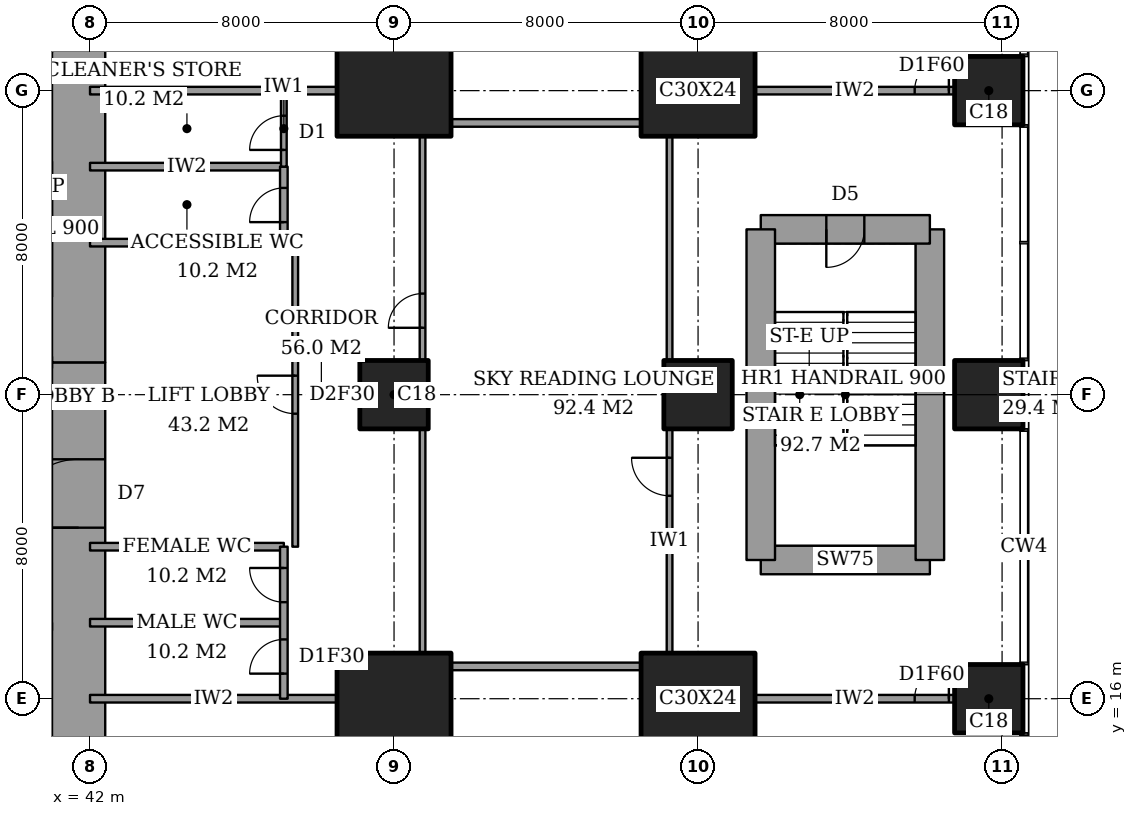
"""IFC4 building model, lengths in metres.
Left out: names, types, materials, properties, quantities, classifications, styles, units other than length and angle.
Written with IfcOpenShell. Run it as: python <this file> out.ifc"""

import sys

from ifc_helpers import new_model, si_unit, direction, frame, frame_2d, origin, origin_2d, place, context, subcontext, project, spatial, rectangle, extrude, element, fill, save


model = new_model("IFC4")
c1 = context("Model", 3, precision=1e-05, world=origin(), true_north=direction((0.0, 1.0)))
c2 = subcontext(c1, "Body", "Model", "MODEL_VIEW")
j1 = project(units=[si_unit("LENGTHUNIT", "METRE"), si_unit("PLANEANGLEUNIT", "RADIAN")], contexts=[c1])
p1 = place(None, origin())
s1 = spatial("IfcSite", under=j1, at=p1, CompositionType="ELEMENT")
p2 = place(p1, origin())
s2 = spatial("IfcBuilding", under=s1, at=p2, CompositionType="ELEMENT")
p3 = place(p2, frame((0.0, 0.0, 177.2)))
s3 = spatial("IfcBuildingStorey", under=s2, at=p3, CompositionType="ELEMENT", Elevation=177.2)
p4 = place(p3, frame((50.0, 16.0, 0.0), z_axis=(0.0, 0.0, 1.0), x_axis=(1.0, 0.0, 0.0)))
e1 = element("IfcColumn", 1, at=p4, inside=s3, PredefinedType="COLUMN", context=c2, shape_type="SweptSolid", body=[
    extrude(rectangle(XDim=3.0, YDim=2.4, at=origin_2d()), origin(), (0.0, 0.0, 1.0), 5.0),
])
p5 = place(p3, frame((50.0, 24.0, 0.0), z_axis=(0.0, 0.0, 1.0), x_axis=(1.0, 0.0, 0.0)))
e2 = element("IfcColumn", 2, at=p5, inside=s3, PredefinedType="COLUMN", context=c2, shape_type="SweptSolid", body=[
    extrude(rectangle(XDim=1.8, YDim=1.8, at=origin_2d()), origin(), (0.0, 0.0, 1.0), 5.0),
])
for number, where, z_axis, x_axis in (
    (3, (50.0, 32.0, 0.0), (0.0, 0.0, 1.0), (1.0, 0.0, 0.0)),
    (4, (58.0, 16.0, 0.0), (0.0, 0.0, 1.0), (1.0, 0.0, 0.0)),
):
    element("IfcColumn", number, at=place(p3, frame(where, z_axis=z_axis, x_axis=x_axis)), inside=s3, PredefinedType="COLUMN", context=c2, shape_type="SweptSolid", body=[
        extrude(rectangle(XDim=3.0, YDim=2.4, at=origin_2d()), origin(), (0.0, 0.0, 1.0), 5.0),
    ])
p6 = place(p3, frame((58.0, 24.0, 0.0), z_axis=(0.0, 0.0, 1.0), x_axis=(1.0, 0.0, 0.0)))
e5 = element("IfcColumn", 5, at=p6, inside=s3, PredefinedType="COLUMN", context=c2, shape_type="SweptSolid", body=[
    extrude(rectangle(XDim=1.8, YDim=1.8, at=origin_2d()), origin(), (0.0, 0.0, 1.0), 5.0),
])
p7 = place(p3, frame((58.0, 32.0, 0.0), z_axis=(0.0, 0.0, 1.0), x_axis=(1.0, 0.0, 0.0)))
e6 = element("IfcColumn", 6, at=p7, inside=s3, PredefinedType="COLUMN", context=c2, shape_type="SweptSolid", body=[
    extrude(rectangle(XDim=3.0, YDim=2.4, at=origin_2d()), origin(), (0.0, 0.0, 1.0), 5.0),
])
for number, where, z_axis, x_axis in (
    (7, (65.65, 16.0, 0.0), (0.0, 0.0, 1.0), (1.0, 0.0, 0.0)),
    (8, (65.65, 24.0, 0.0), (0.0, 0.0, 1.0), (1.0, 0.0, 0.0)),
    (9, (65.65, 32.0, 0.0), (0.0, 0.0, 1.0), (1.0, 0.0, 0.0)),
):
    element("IfcColumn", number, at=place(p3, frame(where, z_axis=z_axis, x_axis=x_axis)), inside=s3, PredefinedType="COLUMN", context=c2, shape_type="SweptSolid", body=[
        extrude(rectangle(XDim=1.8, YDim=1.8, at=origin_2d()), origin(), (0.0, 0.0, 1.0), 5.0),
    ])
p8 = place(p3, frame((41.7, 13.0, 0.0), z_axis=(0.0, 0.0, 1.0), x_axis=(0.0, 1.0, 0.0)))
e10 = element("IfcWall", 10, at=p8, inside=s3, PredefinedType="SHEAR", context=c2, shape_type="SweptSolid", body=[
    extrude(rectangle(XDim=11.85, YDim=1.4, at=frame_2d((5.925, 0.0))), origin(), (0.0, 0.0, 1.0), 5.0),
])
p9 = place(p8, frame((7.5, 0.0, 0.0)))
e11 = element("IfcOpeningElement", 11, at=p9, cuts=e10, PredefinedType="OPENING", context=c2, shape_type="SweptSolid", body=[
    extrude(rectangle(XDim=1.8, YDim=2.4, at=frame_2d((0.9, 1.2))), frame((0.0, 0.71, 0.0), z_axis=(0.0, -1.0, 0.0), x_axis=(1.0, 0.0, 0.0)), (0.0, 0.0, 1.0), 1.42),
])
p10 = place(p3, frame((41.7, 24.85, 0.0), z_axis=(0.0, 0.0, 1.0), x_axis=(0.0, 1.0, 0.0)))
e12 = element("IfcWall", 12, at=p10, inside=s3, PredefinedType="SHEAR", context=c2, shape_type="SweptSolid", body=[
    extrude(rectangle(XDim=10.15, YDim=1.4, at=frame_2d((5.075, 0.0))), origin(), (0.0, 0.0, 1.0), 5.0),
])
p11 = place(p3, frame((59.65, 19.65, 0.0), z_axis=(0.0, 0.0, 1.0), x_axis=(1.0, 0.0, 0.0)))
e13 = element("IfcWall", 13, at=p11, inside=s3, PredefinedType="SHEAR", context=c2, shape_type="SweptSolid", body=[
    extrude(rectangle(XDim=4.45, YDim=0.75, at=frame_2d((2.225, 0.0))), origin(), (0.0, 0.0, 1.0), 5.0),
])
p12 = place(p3, frame((64.1, 19.65, 0.0), z_axis=(0.0, 0.0, 1.0), x_axis=(0.0, 1.0, 0.0)))
e14 = element("IfcWall", 14, at=p12, inside=s3, PredefinedType="SHEAR", context=c2, shape_type="SweptSolid", body=[
    extrude(rectangle(XDim=8.7, YDim=0.75, at=frame_2d((4.35, 0.0))), origin(), (0.0, 0.0, 1.0), 5.0),
])
p13 = place(p3, frame((64.1, 28.35, 0.0), z_axis=(0.0, 0.0, 1.0), x_axis=(-1.0, 0.0, 0.0)))
e15 = element("IfcWall", 15, at=p13, inside=s3, PredefinedType="SHEAR", context=c2, shape_type="SweptSolid", body=[
    extrude(rectangle(XDim=4.45, YDim=0.75, at=frame_2d((2.225, 0.0))), origin(), (0.0, 0.0, 1.0), 5.0),
])
p14 = place(p13, frame((1.725, 0.0, 0.0)))
e16 = element("IfcOpeningElement", 16, at=p14, cuts=e15, PredefinedType="OPENING", context=c2, shape_type="SweptSolid", body=[
    extrude(rectangle(XDim=1.0, YDim=2.1, at=frame_2d((0.5, 1.05))), frame((0.0, 0.385, 0.0), z_axis=(0.0, -1.0, 0.0), x_axis=(1.0, 0.0, 0.0)), (0.0, 0.0, 1.0), 0.77),
])
p15 = place(p3, frame((59.65, 28.35, 0.0), z_axis=(0.0, 0.0, 1.0), x_axis=(0.0, -1.0, 0.0)))
e17 = element("IfcWall", 17, at=p15, inside=s3, PredefinedType="SHEAR", context=c2, shape_type="SweptSolid", body=[
    extrude(rectangle(XDim=8.7, YDim=0.75, at=frame_2d((4.35, 0.0))), origin(), (0.0, 0.0, 1.0), 5.0),
])
p16 = place(p3, frame((42.0, 16.0, 0.0), z_axis=(0.0, 0.0, 1.0), x_axis=(1.0, 0.0, 0.0)))
e18 = element("IfcWall", 18, at=p16, inside=s3, PredefinedType="PARTITIONING", context=c2, shape_type="SweptSolid", body=[
    extrude(rectangle(XDim=6.5, YDim=0.2, at=frame_2d((3.25, 0.0))), origin(), (0.0, 0.0, 1.0), 4.75),
])
p17 = place(p3, frame((59.5, 16.0, 0.0), z_axis=(0.0, 0.0, 1.0), x_axis=(1.0, 0.0, 0.0)))
e19 = element("IfcWall", 19, at=p17, inside=s3, PredefinedType="PARTITIONING", context=c2, shape_type="SweptSolid", body=[
    extrude(rectangle(XDim=5.25, YDim=0.2, at=frame_2d((2.625, 0.0))), origin(), (0.0, 0.0, 1.0), 4.75),
])
p18 = place(p17, frame((4.2, 0.0, 0.0)))
e20 = element("IfcOpeningElement", 20, at=p18, cuts=e19, PredefinedType="OPENING", context=c2, shape_type="SweptSolid", body=[
    extrude(rectangle(XDim=0.9, YDim=2.1, at=frame_2d((0.45, 1.05))), frame((0.0, 0.11, 0.0), z_axis=(0.0, -1.0, 0.0), x_axis=(1.0, 0.0, 0.0)), (0.0, 0.0, 1.0), 0.22),
])
p19 = place(p3, frame((51.5, 16.85, 0.0), z_axis=(0.0, 0.0, 1.0), x_axis=(1.0, 0.0, 0.0)))
e21 = element("IfcWall", 21, at=p19, inside=s3, PredefinedType="PARTITIONING", context=c2, shape_type="SweptSolid", body=[
    extrude(rectangle(XDim=5.0, YDim=0.2, at=frame_2d((2.5, 0.0))), origin(), (0.0, 0.0, 1.0), 4.75),
])
for number, where, z_axis, x_axis in (
    (22, (42.0, 18.0, 0.0), (0.0, 0.0, 1.0), (1.0, 0.0, 0.0)),
    (23, (42.0, 20.0, 0.0), (0.0, 0.0, 1.0), (1.0, 0.0, 0.0)),
    (24, (42.0, 28.0, 0.0), (0.0, 0.0, 1.0), (1.0, 0.0, 0.0)),
    (25, (42.0, 30.0, 0.0), (0.0, 0.0, 1.0), (1.0, 0.0, 0.0)),
):
    element("IfcWall", number, at=place(p3, frame(where, z_axis=z_axis, x_axis=x_axis)), inside=s3, PredefinedType="PARTITIONING", context=c2, shape_type="SweptSolid", body=[
        extrude(rectangle(XDim=5.1, YDim=0.2, at=frame_2d((2.55, 0.0))), origin(), (0.0, 0.0, 1.0), 4.75),
    ])
p20 = place(p3, frame((51.5, 31.15, 0.0), z_axis=(0.0, 0.0, 1.0), x_axis=(1.0, 0.0, 0.0)))
e26 = element("IfcWall", 26, at=p20, inside=s3, PredefinedType="PARTITIONING", context=c2, shape_type="SweptSolid", body=[
    extrude(rectangle(XDim=5.0, YDim=0.2, at=frame_2d((2.5, 0.0))), origin(), (0.0, 0.0, 1.0), 4.75),
])
p21 = place(p3, frame((42.0, 32.0, 0.0), z_axis=(0.0, 0.0, 1.0), x_axis=(1.0, 0.0, 0.0)))
e27 = element("IfcWall", 27, at=p21, inside=s3, PredefinedType="PARTITIONING", context=c2, shape_type="SweptSolid", body=[
    extrude(rectangle(XDim=6.5, YDim=0.2, at=frame_2d((3.25, 0.0))), origin(), (0.0, 0.0, 1.0), 4.75),
])
p22 = place(p3, frame((59.5, 32.0, 0.0), z_axis=(0.0, 0.0, 1.0), x_axis=(1.0, 0.0, 0.0)))
e28 = element("IfcWall", 28, at=p22, inside=s3, PredefinedType="PARTITIONING", context=c2, shape_type="SweptSolid", body=[
    extrude(rectangle(XDim=5.25, YDim=0.2, at=frame_2d((2.625, 0.0))), origin(), (0.0, 0.0, 1.0), 4.75),
])
p23 = place(p22, frame((4.2, 0.0, 0.0)))
e29 = element("IfcOpeningElement", 29, at=p23, cuts=e28, PredefinedType="OPENING", context=c2, shape_type="SweptSolid", body=[
    extrude(rectangle(XDim=0.9, YDim=2.1, at=frame_2d((0.45, 1.05))), frame((0.0, 0.11, 0.0), z_axis=(0.0, -1.0, 0.0), x_axis=(1.0, 0.0, 0.0)), (0.0, 0.0, 1.0), 0.22),
])
p24 = place(p3, frame((47.1, 16.0, 0.0), z_axis=(0.0, 0.0, 1.0), x_axis=(0.0, 1.0, 0.0)))
e30 = element("IfcWall", 30, at=p24, inside=s3, PredefinedType="PARTITIONING", context=c2, shape_type="SweptSolid", body=[
    extrude(rectangle(XDim=4.0, YDim=0.2, at=frame_2d((2.0, 0.0))), origin(), (0.0, 0.0, 1.0), 4.75),
])
p25 = place(p24, frame((0.66, 0.0, 0.0)))
e31 = element("IfcOpeningElement", 31, at=p25, cuts=e30, PredefinedType="OPENING", context=c2, shape_type="SweptSolid", body=[
    extrude(rectangle(XDim=0.9, YDim=2.1, at=frame_2d((0.45, 1.05))), frame((0.0, 0.11, 0.0), z_axis=(0.0, -1.0, 0.0), x_axis=(1.0, 0.0, 0.0)), (0.0, 0.0, 1.0), 0.22),
])
p26 = place(p24, frame((2.54, 0.0, 0.0)))
e32 = element("IfcOpeningElement", 32, at=p26, cuts=e30, PredefinedType="OPENING", context=c2, shape_type="SweptSolid", body=[
    extrude(rectangle(XDim=0.9, YDim=2.1, at=frame_2d((0.45, 1.05))), frame((0.0, 0.11, 0.0), z_axis=(0.0, -1.0, 0.0), x_axis=(1.0, 0.0, 0.0)), (0.0, 0.0, 1.0), 0.22),
])
p27 = place(p3, frame((47.1, 28.0, 0.0), z_axis=(0.0, 0.0, 1.0), x_axis=(0.0, 1.0, 0.0)))
e33 = element("IfcWall", 33, at=p27, inside=s3, PredefinedType="PARTITIONING", context=c2, shape_type="SweptSolid", body=[
    extrude(rectangle(XDim=2.0, YDim=0.2, at=frame_2d((1.0, 0.0))), origin(), (0.0, 0.0, 1.0), 4.75),
])
p28 = place(p27, frame((0.54, 0.0, 0.0)))
e34 = element("IfcOpeningElement", 34, at=p28, cuts=e33, PredefinedType="OPENING", context=c2, shape_type="SweptSolid", body=[
    extrude(rectangle(XDim=0.9, YDim=2.1, at=frame_2d((0.45, 1.05))), frame((0.0, 0.11, 0.0), z_axis=(0.0, -1.0, 0.0), x_axis=(1.0, 0.0, 0.0)), (0.0, 0.0, 1.0), 0.22),
])
p29 = place(p3, frame((47.1, 30.0, 0.0), z_axis=(0.0, 0.0, 1.0), x_axis=(0.0, 1.0, 0.0)))
e35 = element("IfcWall", 35, at=p29, inside=s3, PredefinedType="PARTITIONING", context=c2, shape_type="SweptSolid", body=[
    extrude(rectangle(XDim=2.0, YDim=0.15, at=frame_2d((1.0, 0.0))), origin(), (0.0, 0.0, 1.0), 4.75),
])
p30 = place(p29, frame((0.44, 0.0, 0.0)))
e36 = element("IfcOpeningElement", 36, at=p30, cuts=e35, PredefinedType="OPENING", context=c2, shape_type="SweptSolid", body=[
    extrude(rectangle(XDim=0.9, YDim=2.1, at=frame_2d((0.45, 1.05))), frame((0.0, 0.085, 0.0), z_axis=(0.0, -1.0, 0.0), x_axis=(1.0, 0.0, 0.0)), (0.0, 0.0, 1.0), 0.17),
])
p31 = place(p3, frame((47.4, 20.0, 0.0), z_axis=(0.0, 0.0, 1.0), x_axis=(0.0, 1.0, 0.0)))
e37 = element("IfcWall", 37, at=p31, inside=s3, PredefinedType="PARTITIONING", context=c2, shape_type="SweptSolid", body=[
    extrude(rectangle(XDim=8.0, YDim=0.15, at=frame_2d((4.0, 0.0))), origin(), (0.0, 0.0, 1.0), 4.75),
])
p32 = place(p31, frame((3.5, 0.0, 0.0)))
e38 = element("IfcOpeningElement", 38, at=p32, cuts=e37, PredefinedType="OPENING", context=c2, shape_type="SweptSolid", body=[
    extrude(rectangle(XDim=1.0, YDim=2.1, at=frame_2d((0.5, 1.05))), frame((0.0, 0.085, 0.0), z_axis=(0.0, -1.0, 0.0), x_axis=(1.0, 0.0, 0.0)), (0.0, 0.0, 1.0), 0.17),
])
p33 = place(p3, frame((50.75, 17.2, 0.0), z_axis=(0.0, 0.0, 1.0), x_axis=(0.0, 1.0, 0.0)))
e39 = element("IfcWall", 39, at=p33, inside=s3, PredefinedType="PARTITIONING", context=c2, shape_type="SweptSolid", body=[
    extrude(rectangle(XDim=5.9, YDim=0.15, at=frame_2d((2.95, 0.0))), origin(), (0.0, 0.0, 1.0), 4.75),
])
p34 = place(p3, frame((50.75, 24.9, 0.0), z_axis=(0.0, 0.0, 1.0), x_axis=(0.0, 1.0, 0.0)))
e40 = element("IfcWall", 40, at=p34, inside=s3, PredefinedType="PARTITIONING", context=c2, shape_type="SweptSolid", body=[
    extrude(rectangle(XDim=5.9, YDim=0.15, at=frame_2d((2.95, 0.0))), origin(), (0.0, 0.0, 1.0), 4.75),
])
p35 = place(p34, frame((0.86, 0.0, 0.0)))
e41 = element("IfcOpeningElement", 41, at=p35, cuts=e40, PredefinedType="OPENING", context=c2, shape_type="SweptSolid", body=[
    extrude(rectangle(XDim=0.9, YDim=2.1, at=frame_2d((0.45, 1.05))), frame((0.0, 0.085, 0.0), z_axis=(0.0, -1.0, 0.0), x_axis=(1.0, 0.0, 0.0)), (0.0, 0.0, 1.0), 0.17),
])
p36 = place(p3, frame((57.25, 17.2, 0.0), z_axis=(0.0, 0.0, 1.0), x_axis=(0.0, 1.0, 0.0)))
e42 = element("IfcWall", 42, at=p36, inside=s3, PredefinedType="PARTITIONING", context=c2, shape_type="SweptSolid", body=[
    extrude(rectangle(XDim=5.9, YDim=0.15, at=frame_2d((2.95, 0.0))), origin(), (0.0, 0.0, 1.0), 4.75),
])
p37 = place(p36, frame((4.14, 0.0, 0.0)))
e43 = element("IfcOpeningElement", 43, at=p37, cuts=e42, PredefinedType="OPENING", context=c2, shape_type="SweptSolid", body=[
    extrude(rectangle(XDim=1.0, YDim=2.1, at=frame_2d((0.5, 1.05))), frame((0.0, 0.085, 0.0), z_axis=(0.0, -1.0, 0.0), x_axis=(1.0, 0.0, 0.0)), (0.0, 0.0, 1.0), 0.17),
])
p38 = place(p3, frame((57.25, 24.9, 0.0), z_axis=(0.0, 0.0, 1.0), x_axis=(0.0, 1.0, 0.0)))
e44 = element("IfcWall", 44, at=p38, inside=s3, PredefinedType="PARTITIONING", context=c2, shape_type="SweptSolid", body=[
    extrude(rectangle(XDim=5.9, YDim=0.15, at=frame_2d((2.95, 0.0))), origin(), (0.0, 0.0, 1.0), 4.75),
])
p39 = place(p3, frame((28.3, 17.9, 0.0), z_axis=(0.0, 0.0, 1.0), x_axis=(1.0, 0.0, 0.0)))
e45 = element("IfcWall", 45, at=p39, inside=s3, PredefinedType="PARTITIONING", context=c2, shape_type="SweptSolid", body=[
    extrude(rectangle(XDim=12.7, YDim=0.2, at=frame_2d((6.35, 0.0))), origin(), (0.0, 0.0, 1.0), 5.0),
])
p40 = place(p39, frame((0.95, 0.0, 0.0)))
e46 = element("IfcOpeningElement", 46, at=p40, cuts=e45, PredefinedType="OPENING", context=c2, shape_type="SweptSolid", body=[
    extrude(rectangle(XDim=1.1, YDim=2.1, at=frame_2d((0.55, 1.05))), frame((0.0, 0.11, 0.0), z_axis=(0.0, -1.0, 0.0), x_axis=(1.0, 0.0, 0.0)), (0.0, 0.0, 1.0), 0.22),
])
p41 = place(p39, frame((4.15, 0.0, 0.0)))
e47 = element("IfcOpeningElement", 47, at=p41, cuts=e45, PredefinedType="OPENING", context=c2, shape_type="SweptSolid", body=[
    extrude(rectangle(XDim=1.1, YDim=2.1, at=frame_2d((0.55, 1.05))), frame((0.0, 0.11, 0.0), z_axis=(0.0, -1.0, 0.0), x_axis=(1.0, 0.0, 0.0)), (0.0, 0.0, 1.0), 0.22),
])
p42 = place(p39, frame((7.35, 0.0, 0.0)))
e48 = element("IfcOpeningElement", 48, at=p42, cuts=e45, PredefinedType="OPENING", context=c2, shape_type="SweptSolid", body=[
    extrude(rectangle(XDim=1.1, YDim=2.1, at=frame_2d((0.55, 1.05))), frame((0.0, 0.11, 0.0), z_axis=(0.0, -1.0, 0.0), x_axis=(1.0, 0.0, 0.0)), (0.0, 0.0, 1.0), 0.22),
])
p43 = place(p39, frame((10.6, 0.0, 0.0)))
e49 = element("IfcOpeningElement", 49, at=p43, cuts=e45, PredefinedType="OPENING", context=c2, shape_type="SweptSolid", body=[
    extrude(rectangle(XDim=1.2, YDim=2.1, at=frame_2d((0.6, 1.05))), frame((0.0, 0.11, 0.0), z_axis=(0.0, -1.0, 0.0), x_axis=(1.0, 0.0, 0.0)), (0.0, 0.0, 1.0), 0.22),
])
p44 = place(p37, origin())
e50 = element("IfcDoor", 50, at=p44, inside=s3, OperationType="SINGLE_SWING_LEFT", PredefinedType="DOOR", context=c2, shape_type="SweptSolid", body=[
    extrude(rectangle(XDim=1.0, YDim=2.1, at=frame_2d((0.5, 1.05))), frame((0.0, 0.025, 0.0), z_axis=(0.0, -1.0, 0.0), x_axis=(1.0, 0.0, 0.0)), (0.0, 0.0, 1.0), 0.05),
])
fill(e43, e50)
p45 = place(p35, origin())
e51 = element("IfcDoor", 51, at=p45, inside=s3, OperationType="SINGLE_SWING_RIGHT", PredefinedType="DOOR", context=c2, shape_type="SweptSolid", body=[
    extrude(rectangle(XDim=0.9, YDim=2.1, at=frame_2d((0.45, 1.05))), frame((0.0, 0.025, 0.0), z_axis=(0.0, -1.0, 0.0), x_axis=(1.0, 0.0, 0.0)), (0.0, 0.0, 1.0), 0.05),
])
fill(e41, e51)
p46 = place(p32, origin())
e52 = element("IfcDoor", 52, at=p46, inside=s3, OperationType="SINGLE_SWING_LEFT", PredefinedType="DOOR", context=c2, shape_type="SweptSolid", body=[
    extrude(rectangle(XDim=1.0, YDim=2.1, at=frame_2d((0.5, 1.05))), frame((0.0, 0.025, 0.0), z_axis=(0.0, -1.0, 0.0), x_axis=(1.0, 0.0, 0.0)), (0.0, 0.0, 1.0), 0.05),
])
fill(e38, e52)
p47 = place(p25, origin())
e53 = element("IfcDoor", 53, at=p47, inside=s3, OperationType="SINGLE_SWING_RIGHT", PredefinedType="DOOR", context=c2, shape_type="SweptSolid", body=[
    extrude(rectangle(XDim=0.9, YDim=2.1, at=frame_2d((0.45, 1.05))), frame((0.0, 0.025, 0.0), z_axis=(0.0, -1.0, 0.0), x_axis=(1.0, 0.0, 0.0)), (0.0, 0.0, 1.0), 0.05),
])
fill(e31, e53)
p48 = place(p26, origin())
e54 = element("IfcDoor", 54, at=p48, inside=s3, OperationType="SINGLE_SWING_LEFT", PredefinedType="DOOR", context=c2, shape_type="SweptSolid", body=[
    extrude(rectangle(XDim=0.9, YDim=2.1, at=frame_2d((0.45, 1.05))), frame((0.0, 0.025, 0.0), z_axis=(0.0, -1.0, 0.0), x_axis=(1.0, 0.0, 0.0)), (0.0, 0.0, 1.0), 0.05),
])
fill(e32, e54)
p49 = place(p28, origin())
e55 = element("IfcDoor", 55, at=p49, inside=s3, OperationType="SINGLE_SWING_RIGHT", PredefinedType="DOOR", context=c2, shape_type="SweptSolid", body=[
    extrude(rectangle(XDim=0.9, YDim=2.1, at=frame_2d((0.45, 1.05))), frame((0.0, 0.025, 0.0), z_axis=(0.0, -1.0, 0.0), x_axis=(1.0, 0.0, 0.0)), (0.0, 0.0, 1.0), 0.05),
])
fill(e34, e55)
p50 = place(p30, origin())
e56 = element("IfcDoor", 56, at=p50, inside=s3, OperationType="SINGLE_SWING_RIGHT", PredefinedType="DOOR", context=c2, shape_type="SweptSolid", body=[
    extrude(rectangle(XDim=0.9, YDim=2.1, at=frame_2d((0.45, 1.05))), frame((0.0, 0.025, 0.0), z_axis=(0.0, -1.0, 0.0), x_axis=(1.0, 0.0, 0.0)), (0.0, 0.0, 1.0), 0.05),
])
fill(e36, e56)
p51 = place(p18, origin())
e57 = element("IfcDoor", 57, at=p51, inside=s3, OperationType="SINGLE_SWING_LEFT", PredefinedType="DOOR", context=c2, shape_type="SweptSolid", body=[
    extrude(rectangle(XDim=0.9, YDim=2.1, at=frame_2d((0.45, 1.05))), frame((0.0, 0.025, 0.0), z_axis=(0.0, -1.0, 0.0), x_axis=(1.0, 0.0, 0.0)), (0.0, 0.0, 1.0), 0.05),
])
fill(e20, e57)
p52 = place(p23, origin())
e58 = element("IfcDoor", 58, at=p52, inside=s3, OperationType="SINGLE_SWING_LEFT", PredefinedType="DOOR", context=c2, shape_type="SweptSolid", body=[
    extrude(rectangle(XDim=0.9, YDim=2.1, at=frame_2d((0.45, 1.05))), frame((0.0, 0.025, 0.0), z_axis=(0.0, -1.0, 0.0), x_axis=(1.0, 0.0, 0.0)), (0.0, 0.0, 1.0), 0.05),
])
fill(e29, e58)
p53 = place(p9, origin())
e59 = element("IfcDoor", 59, at=p53, inside=s3, OperationType="DOUBLE_DOOR_DOUBLE_SWING", PredefinedType="DOOR", context=c2, shape_type="SweptSolid", body=[
    extrude(rectangle(XDim=1.8, YDim=2.4, at=frame_2d((0.9, 1.2))), frame((0.0, 0.025, 0.0), z_axis=(0.0, -1.0, 0.0), x_axis=(1.0, 0.0, 0.0)), (0.0, 0.0, 1.0), 0.05),
])
fill(e11, e59)
p54 = place(p14, origin())
e60 = element("IfcDoor", 60, at=p54, inside=s3, OperationType="SINGLE_SWING_LEFT", PredefinedType="DOOR", context=c2, shape_type="SweptSolid", body=[
    extrude(rectangle(XDim=1.0, YDim=2.1, at=frame_2d((0.5, 1.05))), frame((0.0, 0.025, 0.0), z_axis=(0.0, -1.0, 0.0), x_axis=(1.0, 0.0, 0.0)), (0.0, 0.0, 1.0), 0.05),
])
fill(e16, e60)
save(model, sys.argv[1])
